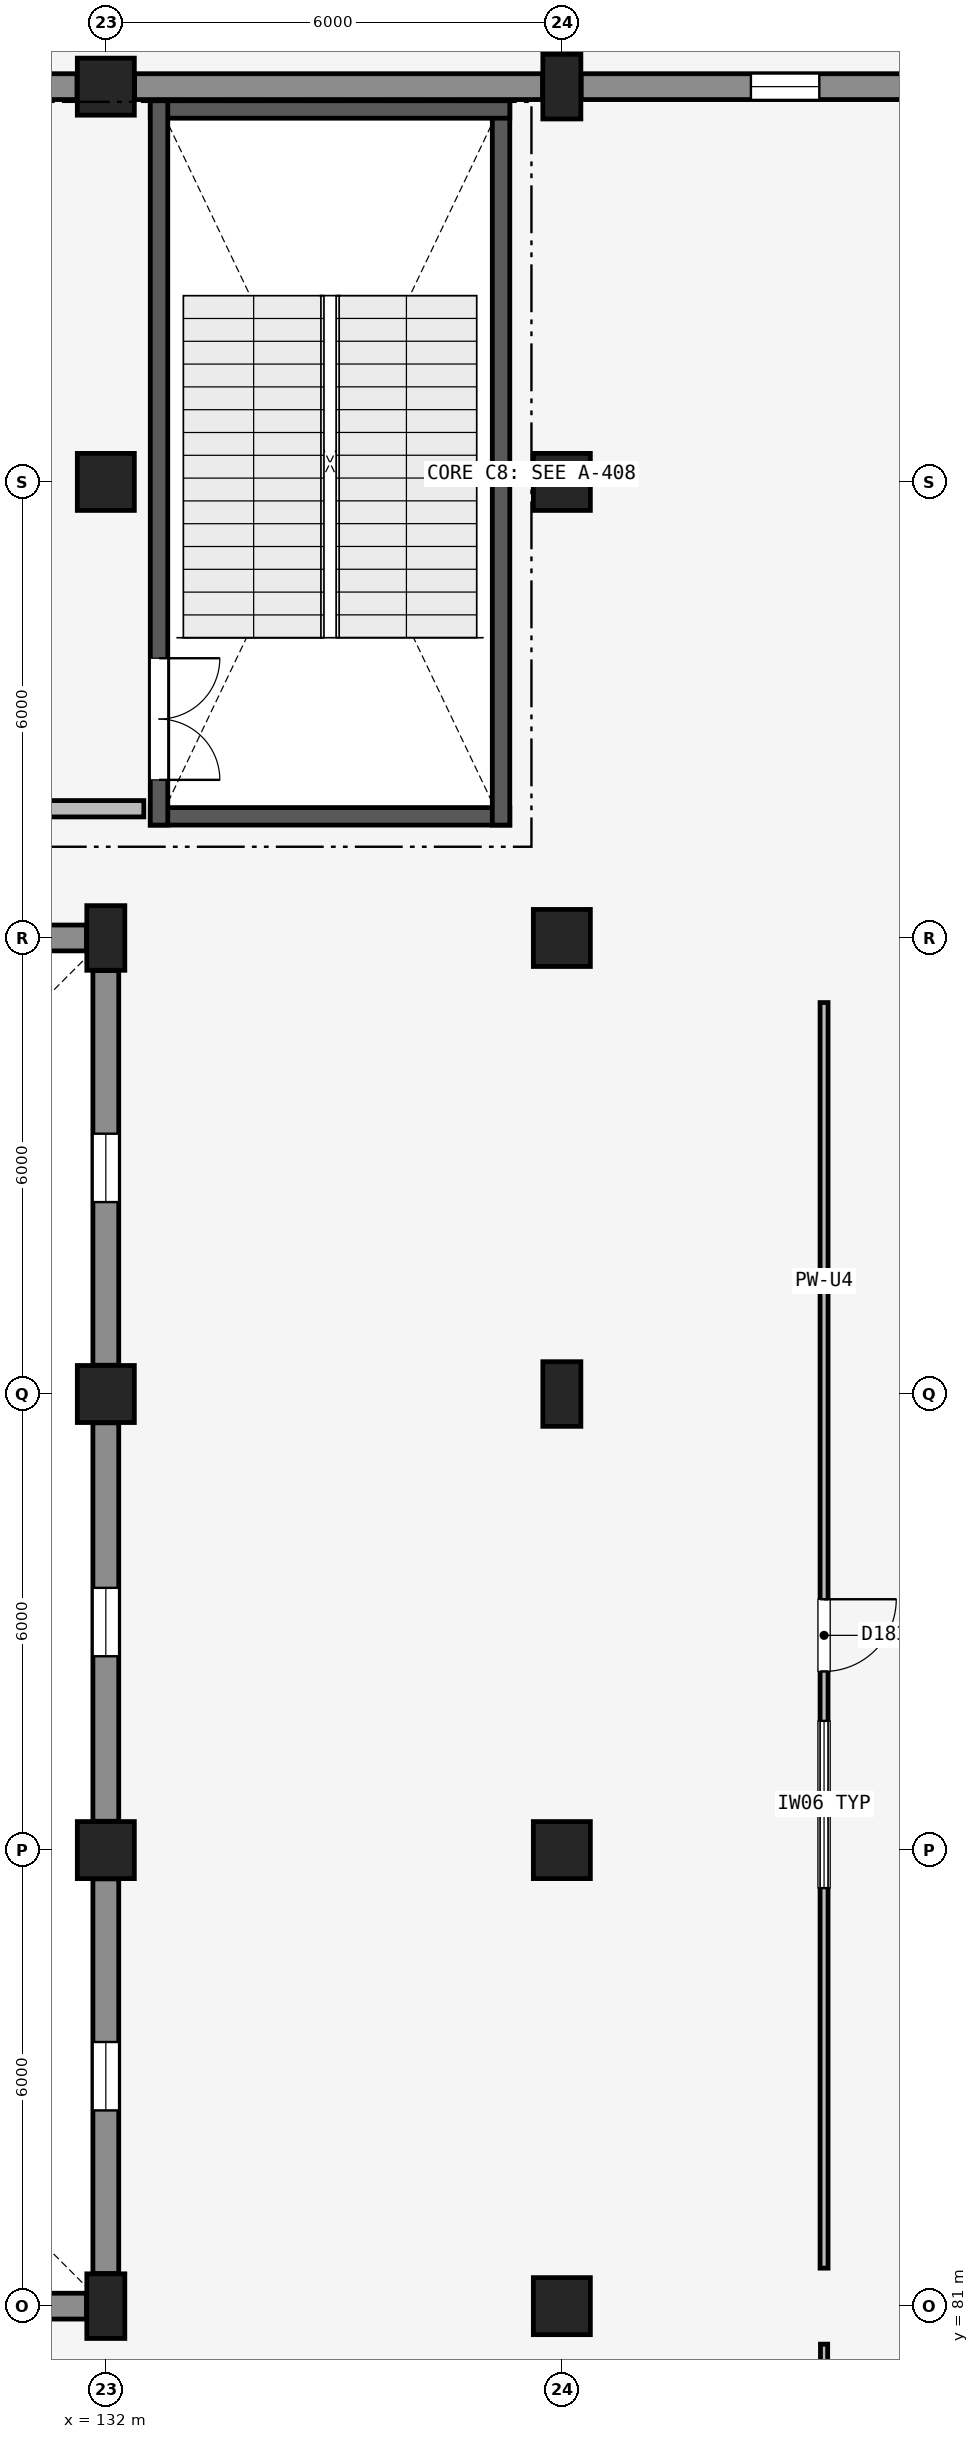
"""IFC4 building model, lengths in metres.
Left out: names, types, materials, properties, quantities, classifications, styles, units other than length and angle.
Written with IfcOpenShell. Run it as: python <this file> out.ifc"""

import sys

from ifc_helpers import new_model, si_unit, direction, frame, frame_2d, origin, origin_2d, place, context, subcontext, project, spatial, rectangle, extrude, element, fill, save


model = new_model("IFC4")
c1 = context("Model", 3, precision=1e-05, world=origin(), true_north=direction((0.0, 1.0)))
c2 = subcontext(c1, "Body", "Model", "MODEL_VIEW")
j1 = project(units=[si_unit("LENGTHUNIT", "METRE"), si_unit("PLANEANGLEUNIT", "RADIAN")], contexts=[c1])
p1 = place(None, origin())
s1 = spatial("IfcSite", under=j1, at=p1, CompositionType="ELEMENT")
p2 = place(p1, origin())
s2 = spatial("IfcBuilding", under=s1, at=p2, CompositionType="ELEMENT")
p3 = place(p2, origin())
s3 = spatial("IfcBuildingStorey", under=s2, at=p3, CompositionType="ELEMENT", Elevation=0.0)
p4 = place(p3, frame((132.0, 81.0, 0.0), z_axis=(0.0, 0.0, 1.0), x_axis=(1.0, 0.0, 0.0)))
e1 = element("IfcColumn", 1, at=p4, inside=s3, PredefinedType="COLUMN", context=c2, shape_type="SweptSolid", body=[
    extrude(rectangle(XDim=0.5, YDim=0.85, at=origin_2d()), origin(), (0.0, 0.0, 1.0), 4.8),
])
for number, where, z_axis, x_axis in (
    (2, (132.0, 87.0, 0.0), (0.0, 0.0, 1.0), (1.0, 0.0, 0.0)),
    (3, (132.0, 93.0, 0.0), (0.0, 0.0, 1.0), (1.0, 0.0, 0.0)),
):
    element("IfcColumn", number, at=place(p3, frame(where, z_axis=z_axis, x_axis=x_axis)), inside=s3, PredefinedType="COLUMN", context=c2, shape_type="SweptSolid", body=[
        extrude(rectangle(XDim=0.75, YDim=0.75, at=origin_2d()), origin(), (0.0, 0.0, 1.0), 4.8),
    ])
p5 = place(p3, frame((132.0, 99.0, 0.0), z_axis=(0.0, 0.0, 1.0), x_axis=(1.0, 0.0, 0.0)))
e4 = element("IfcColumn", 4, at=p5, inside=s3, PredefinedType="COLUMN", context=c2, shape_type="SweptSolid", body=[
    extrude(rectangle(XDim=0.5, YDim=0.85, at=origin_2d()), origin(), (0.0, 0.0, 1.0), 4.8),
])
for number, where, z_axis, x_axis in (
    (5, (132.0, 105.0, 0.0), (0.0, 0.0, 1.0), (1.0, 0.0, 0.0)),
    (6, (132.0, 110.2, 0.0), (0.0, 0.0, 1.0), (1.0, 0.0, 0.0)),
    (7, (138.0, 81.0, 0.0), (0.0, 0.0, 1.0), (1.0, 0.0, 0.0)),
    (8, (138.0, 87.0, 0.0), (0.0, 0.0, 1.0), (1.0, 0.0, 0.0)),
):
    element("IfcColumn", number, at=place(p3, frame(where, z_axis=z_axis, x_axis=x_axis)), inside=s3, PredefinedType="COLUMN", context=c2, shape_type="SweptSolid", body=[
        extrude(rectangle(XDim=0.75, YDim=0.75, at=origin_2d()), origin(), (0.0, 0.0, 1.0), 4.8),
    ])
p6 = place(p3, frame((138.0, 93.0, 0.0), z_axis=(0.0, 0.0, 1.0), x_axis=(1.0, 0.0, 0.0)))
e9 = element("IfcColumn", 9, at=p6, inside=s3, PredefinedType="COLUMN", context=c2, shape_type="SweptSolid", body=[
    extrude(rectangle(XDim=0.5, YDim=0.85, at=origin_2d()), origin(), (0.0, 0.0, 1.0), 4.8),
])
for number, where, z_axis, x_axis in (
    (10, (138.0, 99.0, 0.0), (0.0, 0.0, 1.0), (1.0, 0.0, 0.0)),
    (11, (138.0, 105.0, 0.0), (0.0, 0.0, 1.0), (1.0, 0.0, 0.0)),
):
    element("IfcColumn", number, at=place(p3, frame(where, z_axis=z_axis, x_axis=x_axis)), inside=s3, PredefinedType="COLUMN", context=c2, shape_type="SweptSolid", body=[
        extrude(rectangle(XDim=0.75, YDim=0.75, at=origin_2d()), origin(), (0.0, 0.0, 1.0), 4.8),
    ])
p7 = place(p3, frame((138.0, 110.2, 0.0), z_axis=(0.0, 0.0, 1.0), x_axis=(1.0, 0.0, 0.0)))
e12 = element("IfcColumn", 12, at=p7, inside=s3, PredefinedType="COLUMN", context=c2, shape_type="SweptSolid", body=[
    extrude(rectangle(XDim=0.5, YDim=0.85, at=origin_2d()), origin(), (0.0, 0.0, 1.0), 4.8),
])
p8 = place(p3, frame((126.379, 110.2, 0.0), z_axis=(0.0, 0.0, 1.0), x_axis=(1.0, 0.0, 0.0)))
e13 = element("IfcWall", 13, at=p8, inside=s3, PredefinedType="SOLIDWALL", context=c2, shape_type="SweptSolid", body=[
    extrude(rectangle(XDim=5.242, YDim=0.34, at=frame_2d((2.621, 0.0))), origin(), (0.0, 0.0, 1.0), 4.083),
])
p9 = place(p8, frame((1.621, 0.0, 0.0)))
e14 = element("IfcOpeningElement", 14, at=p9, cuts=e13, PredefinedType="OPENING", context=c2, shape_type="SweptSolid", body=[
    extrude(rectangle(XDim=2.0, YDim=2.4, at=frame_2d((1.0, 1.2))), frame((0.0, 0.18, 0.0), z_axis=(0.0, -1.0, 0.0), x_axis=(1.0, 0.0, 0.0)), (0.0, 0.0, 1.0), 0.36),
])
p10 = place(p3, frame((132.379, 110.2, 0.0), z_axis=(0.0, 0.0, 1.0), x_axis=(1.0, 0.0, 0.0)))
e15 = element("IfcWall", 15, at=p10, inside=s3, PredefinedType="SOLIDWALL", context=c2, shape_type="SweptSolid", body=[
    extrude(rectangle(XDim=5.367, YDim=0.34, at=frame_2d((2.684, 0.0))), origin(), (0.0, 0.0, 1.0), 4.083),
])
p11 = place(p3, frame((138.254, 110.2, 0.0), z_axis=(0.0, 0.0, 1.0), x_axis=(1.0, 0.0, 0.0)))
e16 = element("IfcWall", 16, at=p11, inside=s3, PredefinedType="SOLIDWALL", context=c2, shape_type="SweptSolid", body=[
    extrude(rectangle(XDim=5.367, YDim=0.34, at=frame_2d((2.684, 0.0))), origin(), (0.0, 0.0, 1.0), 4.083),
])
p12 = place(p11, frame((2.233, 0.0, 1.6)))
e17 = element("IfcOpeningElement", 17, at=p12, cuts=e16, PredefinedType="OPENING", context=c2, shape_type="SweptSolid", body=[
    extrude(rectangle(XDim=0.9, YDim=0.6, at=frame_2d((0.45, 0.3))), frame((0.0, 0.18, 0.0), z_axis=(0.0, -1.0, 0.0), x_axis=(1.0, 0.0, 0.0)), (0.0, 0.0, 1.0), 0.36),
])
p13 = place(p3, frame((126.379, 81.0, 0.0), z_axis=(0.0, 0.0, 1.0), x_axis=(1.0, 0.0, 0.0)))
e18 = element("IfcWall", 18, at=p13, inside=s3, PredefinedType="SOLIDWALL", context=c2, shape_type="SweptSolid", body=[
    extrude(rectangle(XDim=5.367, YDim=0.34, at=frame_2d((2.684, 0.0))), origin(), (0.0, 0.0, 1.0), 4.04),
])
p14 = place(p13, frame((2.233, 0.0, 1.6)))
e19 = element("IfcOpeningElement", 19, at=p14, cuts=e18, PredefinedType="OPENING", context=c2, shape_type="SweptSolid", body=[
    extrude(rectangle(XDim=0.9, YDim=0.6, at=frame_2d((0.45, 0.3))), frame((0.0, 0.18, 0.0), z_axis=(0.0, -1.0, 0.0), x_axis=(1.0, 0.0, 0.0)), (0.0, 0.0, 1.0), 0.36),
])
p15 = place(p3, frame((126.379, 99.0, 0.0), z_axis=(0.0, 0.0, 1.0), x_axis=(1.0, 0.0, 0.0)))
e20 = element("IfcWall", 20, at=p15, inside=s3, PredefinedType="SOLIDWALL", context=c2, shape_type="SweptSolid", body=[
    extrude(rectangle(XDim=5.367, YDim=0.34, at=frame_2d((2.684, 0.0))), origin(), (0.0, 0.0, 1.0), 4.04),
])
p16 = place(p15, frame((2.233, 0.0, 1.6)))
e21 = element("IfcOpeningElement", 21, at=p16, cuts=e20, PredefinedType="OPENING", context=c2, shape_type="SweptSolid", body=[
    extrude(rectangle(XDim=0.9, YDim=0.6, at=frame_2d((0.45, 0.3))), frame((0.0, 0.18, 0.0), z_axis=(0.0, -1.0, 0.0), x_axis=(1.0, 0.0, 0.0)), (0.0, 0.0, 1.0), 0.36),
])
p17 = place(p3, frame((132.0, 81.429, 0.0), z_axis=(0.0, 0.0, 1.0), x_axis=(0.0, 1.0, 0.0)))
e22 = element("IfcWall", 22, at=p17, inside=s3, PredefinedType="SOLIDWALL", context=c2, shape_type="SweptSolid", body=[
    extrude(rectangle(XDim=5.192, YDim=0.34, at=frame_2d((2.596, 0.0))), origin(), (0.0, 0.0, 1.0), 4.166),
])
p18 = place(p17, frame((2.146, 0.0, 1.6)))
e23 = element("IfcOpeningElement", 23, at=p18, cuts=e22, PredefinedType="OPENING", context=c2, shape_type="SweptSolid", body=[
    extrude(rectangle(XDim=0.9, YDim=0.6, at=frame_2d((0.45, 0.3))), frame((0.0, 0.18, 0.0), z_axis=(0.0, -1.0, 0.0), x_axis=(1.0, 0.0, 0.0)), (0.0, 0.0, 1.0), 0.36),
])
p19 = place(p3, frame((132.0, 87.379, 0.0), z_axis=(0.0, 0.0, 1.0), x_axis=(0.0, 1.0, 0.0)))
e24 = element("IfcWall", 24, at=p19, inside=s3, PredefinedType="SOLIDWALL", context=c2, shape_type="SweptSolid", body=[
    extrude(rectangle(XDim=5.242, YDim=0.34, at=frame_2d((2.621, 0.0))), origin(), (0.0, 0.0, 1.0), 3.99),
])
p20 = place(p19, frame((2.171, 0.0, 1.6)))
e25 = element("IfcOpeningElement", 25, at=p20, cuts=e24, PredefinedType="OPENING", context=c2, shape_type="SweptSolid", body=[
    extrude(rectangle(XDim=0.9, YDim=0.6, at=frame_2d((0.45, 0.3))), frame((0.0, 0.18, 0.0), z_axis=(0.0, -1.0, 0.0), x_axis=(1.0, 0.0, 0.0)), (0.0, 0.0, 1.0), 0.36),
])
p21 = place(p3, frame((132.0, 93.379, 0.0), z_axis=(0.0, 0.0, 1.0), x_axis=(0.0, 1.0, 0.0)))
e26 = element("IfcWall", 26, at=p21, inside=s3, PredefinedType="SOLIDWALL", context=c2, shape_type="SweptSolid", body=[
    extrude(rectangle(XDim=5.192, YDim=0.34, at=frame_2d((2.596, 0.0))), origin(), (0.0, 0.0, 1.0), 4.04),
])
p22 = place(p21, frame((2.146, 0.0, 1.6)))
e27 = element("IfcOpeningElement", 27, at=p22, cuts=e26, PredefinedType="OPENING", context=c2, shape_type="SweptSolid", body=[
    extrude(rectangle(XDim=0.9, YDim=0.6, at=frame_2d((0.45, 0.3))), frame((0.0, 0.18, 0.0), z_axis=(0.0, -1.0, 0.0), x_axis=(1.0, 0.0, 0.0)), (0.0, 0.0, 1.0), 0.36),
])
p23 = place(p3, frame((132.585, 100.6, 0.0), z_axis=(0.0, 0.0, 1.0), x_axis=(1.0, 0.0, 0.0)))
e28 = element("IfcWall", 28, at=p23, inside=s3, PredefinedType="SHEAR", context=c2, shape_type="SweptSolid", body=[
    extrude(rectangle(XDim=4.73, YDim=0.23, at=frame_2d((2.365, 0.0))), origin(), (0.0, 0.0, 1.0), 4.66),
])
p24 = place(p3, frame((137.2, 100.485, 0.0), z_axis=(0.0, 0.0, 1.0), x_axis=(0.0, 1.0, 0.0)))
e29 = element("IfcWall", 29, at=p24, inside=s3, PredefinedType="SHEAR", context=c2, shape_type="SweptSolid", body=[
    extrude(rectangle(XDim=9.53, YDim=0.23, at=frame_2d((4.765, 0.0))), origin(), (0.0, 0.0, 1.0), 4.66),
])
p25 = place(p3, frame((137.315, 109.9, 0.0), z_axis=(0.0, 0.0, 1.0), x_axis=(-1.0, 0.0, 0.0)))
e30 = element("IfcWall", 30, at=p25, inside=s3, PredefinedType="SHEAR", context=c2, shape_type="SweptSolid", body=[
    extrude(rectangle(XDim=4.73, YDim=0.23, at=frame_2d((2.365, 0.0))), origin(), (0.0, 0.0, 1.0), 4.66),
])
p26 = place(p3, frame((132.7, 110.015, 0.0), z_axis=(0.0, 0.0, 1.0), x_axis=(0.0, -1.0, 0.0)))
e31 = element("IfcWall", 31, at=p26, inside=s3, PredefinedType="SHEAR", context=c2, shape_type="SweptSolid", body=[
    extrude(rectangle(XDim=9.53, YDim=0.23, at=frame_2d((4.765, 0.0))), origin(), (0.0, 0.0, 1.0), 4.66),
])
p27 = place(p26, frame((7.335, 0.0, 0.0)))
e32 = element("IfcOpeningElement", 32, at=p27, cuts=e31, PredefinedType="OPENING", context=c2, shape_type="SweptSolid", body=[
    extrude(rectangle(XDim=1.6, YDim=2.2, at=frame_2d((0.8, 1.1))), frame((0.0, 0.125, 0.0), z_axis=(0.0, -1.0, 0.0), x_axis=(1.0, 0.0, 0.0)), (0.0, 0.0, 1.0), 0.25),
])
p28 = place(p3, frame((126.75, 100.7, 0.0), z_axis=(0.0, 0.0, 1.0), x_axis=(1.0, 0.0, 0.0)))
e33 = element("IfcWall", 33, at=p28, inside=s3, PredefinedType="PARTITIONING", context=c2, shape_type="SweptSolid", body=[
    extrude(rectangle(XDim=5.75, YDim=0.215, at=frame_2d((2.875, 0.0))), origin(), (0.0, 0.0, 1.0), 4.09),
])
p29 = place(p28, frame((2.125, 0.0, 0.0)))
e34 = element("IfcOpeningElement", 34, at=p29, cuts=e33, PredefinedType="OPENING", context=c2, shape_type="SweptSolid", body=[
    extrude(rectangle(XDim=1.5, YDim=2.15, at=frame_2d((0.75, 1.075))), frame((0.0, 0.117, 0.0), z_axis=(0.0, -1.0, 0.0), x_axis=(1.0, 0.0, 0.0)), (0.0, 0.0, 1.0), 0.235),
])
p30 = place(p3, frame((141.45, 98.15, 0.0), z_axis=(0.0, 0.0, 1.0), x_axis=(0.0, -1.0, 0.0)))
e35 = element("IfcWall", 35, at=p30, inside=s3, PredefinedType="PARTITIONING", context=c2, shape_type="SweptSolid", body=[
    extrude(rectangle(XDim=16.65, YDim=0.105, at=frame_2d((8.325, 0.0))), origin(), (0.0, 0.0, 1.0), 3.89),
])
p31 = place(p30, frame((7.85, 0.0, 0.0)))
e36 = element("IfcOpeningElement", 36, at=p31, cuts=e35, PredefinedType="OPENING", context=c2, shape_type="SweptSolid", body=[
    extrude(rectangle(XDim=0.95, YDim=2.15, at=frame_2d((0.475, 1.075))), frame((0.0, 0.062, 0.0), z_axis=(0.0, -1.0, 0.0), x_axis=(1.0, 0.0, 0.0)), (0.0, 0.0, 1.0), 0.125),
])
p32 = place(p30, frame((9.45, 0.0, 0.9)))
e37 = element("IfcOpeningElement", 37, at=p32, cuts=e35, PredefinedType="OPENING", context=c2, shape_type="SweptSolid", body=[
    extrude(rectangle(XDim=2.2, YDim=1.4, at=frame_2d((1.1, 0.7))), frame((0.0, 0.062, 0.0), z_axis=(0.0, -1.0, 0.0), x_axis=(1.0, 0.0, 0.0)), (0.0, 0.0, 1.0), 0.125),
])
p33 = place(p3, frame((141.45, 80.5, 0.0), z_axis=(0.0, 0.0, 1.0), x_axis=(9.0340357e-05, -0.999999995919, 0.0)))
e38 = element("IfcWall", 38, at=p33, inside=s3, PredefinedType="PARTITIONING", context=c2, shape_type="SweptSolid", body=[
    extrude(rectangle(XDim=10.81, YDim=0.095, at=frame_2d((5.405, 0.0))), origin(), (0.0, 0.0, 1.0), 3.89),
])
p34 = place(p33, frame((4.78, 0.0, 0.0)))
e39 = element("IfcOpeningElement", 39, at=p34, cuts=e38, PredefinedType="OPENING", context=c2, shape_type="SweptSolid", body=[
    extrude(rectangle(XDim=1.25, YDim=2.15, at=frame_2d((0.625, 1.075))), frame((0.0, 0.057, 0.0), z_axis=(0.0, -1.0, 0.0), x_axis=(1.0, 0.0, 0.0)), (0.0, 0.0, 1.0), 0.115),
])
p35 = place(p33, frame((6.68, 0.0, 1.0)))
e40 = element("IfcOpeningElement", 40, at=p35, cuts=e38, PredefinedType="OPENING", context=c2, shape_type="SweptSolid", body=[
    extrude(rectangle(XDim=1.5, YDim=1.2, at=frame_2d((0.75, 0.6))), frame((0.0, 0.057, 0.0), z_axis=(0.0, -1.0, 0.0), x_axis=(1.0, 0.0, 0.0)), (0.0, 0.0, 1.0), 0.115),
])
p36 = place(p12, origin())
e41 = element("IfcWindow", 41, at=p36, inside=s3, PartitioningType="SINGLE_PANEL", PredefinedType="WINDOW", context=c2, shape_type="SweptSolid", body=[
    extrude(rectangle(XDim=0.9, YDim=0.6, at=frame_2d((0.45, 0.3))), frame((0.0, 0.03, 0.0), z_axis=(0.0, -1.0, 0.0), x_axis=(1.0, 0.0, 0.0)), (0.0, 0.0, 1.0), 0.06),
])
fill(e17, e41)
p37 = place(p18, origin())
e42 = element("IfcWindow", 42, at=p37, inside=s3, PartitioningType="SINGLE_PANEL", PredefinedType="WINDOW", context=c2, shape_type="SweptSolid", body=[
    extrude(rectangle(XDim=0.9, YDim=0.6, at=frame_2d((0.45, 0.3))), frame((0.0, 0.03, 0.0), z_axis=(0.0, -1.0, 0.0), x_axis=(1.0, 0.0, 0.0)), (0.0, 0.0, 1.0), 0.06),
])
fill(e23, e42)
p38 = place(p20, origin())
e43 = element("IfcWindow", 43, at=p38, inside=s3, PartitioningType="SINGLE_PANEL", PredefinedType="WINDOW", context=c2, shape_type="SweptSolid", body=[
    extrude(rectangle(XDim=0.9, YDim=0.6, at=frame_2d((0.45, 0.3))), frame((0.0, 0.03, 0.0), z_axis=(0.0, -1.0, 0.0), x_axis=(1.0, 0.0, 0.0)), (0.0, 0.0, 1.0), 0.06),
])
fill(e25, e43)
p39 = place(p22, origin())
e44 = element("IfcWindow", 44, at=p39, inside=s3, PartitioningType="SINGLE_PANEL", PredefinedType="WINDOW", context=c2, shape_type="SweptSolid", body=[
    extrude(rectangle(XDim=0.9, YDim=0.6, at=frame_2d((0.45, 0.3))), frame((0.0, 0.03, 0.0), z_axis=(0.0, -1.0, 0.0), x_axis=(1.0, 0.0, 0.0)), (0.0, 0.0, 1.0), 0.06),
])
fill(e27, e44)
p40 = place(p27, origin())
e45 = element("IfcDoor", 45, at=p40, inside=s3, OperationType="DOUBLE_DOOR_SINGLE_SWING", PredefinedType="DOOR", context=c2, shape_type="SweptSolid", body=[
    extrude(rectangle(XDim=1.6, YDim=2.2, at=frame_2d((0.8, 1.1))), frame((0.0, 0.025, 0.0), z_axis=(0.0, -1.0, 0.0), x_axis=(1.0, 0.0, 0.0)), (0.0, 0.0, 1.0), 0.05),
])
fill(e32, e45)
p41 = place(p31, origin())
e46 = element("IfcDoor", 46, at=p41, inside=s3, OperationType="SINGLE_SWING_LEFT", PredefinedType="DOOR", context=c2, shape_type="SweptSolid", body=[
    extrude(rectangle(XDim=0.95, YDim=2.15, at=frame_2d((0.475, 1.075))), frame((0.0, 0.025, 0.0), z_axis=(0.0, -1.0, 0.0), x_axis=(1.0, 0.0, 0.0)), (0.0, 0.0, 1.0), 0.05),
])
fill(e36, e46)
p42 = place(p32, origin())
e47 = element("IfcWindow", 47, at=p42, inside=s3, PartitioningType="SINGLE_PANEL", PredefinedType="WINDOW", context=c2, shape_type="SweptSolid", body=[
    extrude(rectangle(XDim=2.2, YDim=1.4, at=frame_2d((1.1, 0.7))), frame((0.0, 0.03, 0.0), z_axis=(0.0, -1.0, 0.0), x_axis=(1.0, 0.0, 0.0)), (0.0, 0.0, 1.0), 0.06),
])
fill(e37, e47)
save(model, sys.argv[1])
